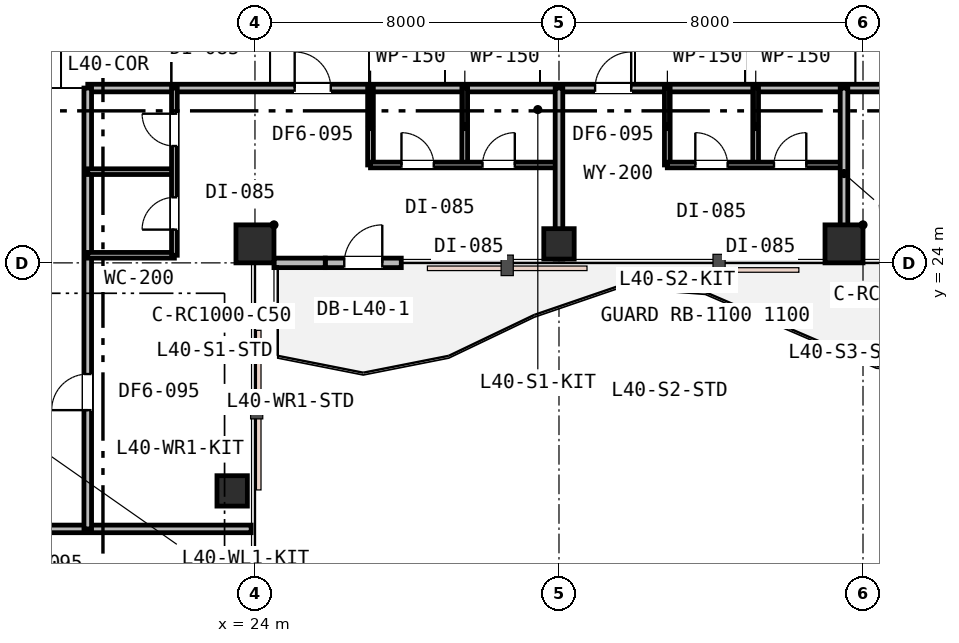
"""IFC4 building model, lengths in metres.
Left out: names, types, materials, properties, quantities, classifications, styles, units other than length and angle.
Written with IfcOpenShell. Run it as: python <this file> out.ifc"""

import sys

from ifc_helpers import new_model, si_unit, direction, frame, frame_2d, origin, origin_2d, place, context, subcontext, project, spatial, rectangle, extrude, element, fill, save


model = new_model("IFC4")
c1 = context("Model", 3, precision=1e-05, world=origin(), true_north=direction((0.0, 1.0)))
c2 = subcontext(c1, "Body", "Model", "MODEL_VIEW")
j1 = project(units=[si_unit("LENGTHUNIT", "METRE"), si_unit("PLANEANGLEUNIT", "RADIAN")], contexts=[c1])
p1 = place(None, origin())
s1 = spatial("IfcSite", under=j1, at=p1, CompositionType="ELEMENT")
p2 = place(p1, origin())
s2 = spatial("IfcBuilding", under=s1, at=p2, CompositionType="ELEMENT")
p3 = place(p2, frame((0.0, 0.0, 157.8)))
s3 = spatial("IfcBuildingStorey", under=s2, at=p3, CompositionType="ELEMENT", Elevation=157.8)
p4 = place(p3, frame((24.0, 24.5, 0.0), z_axis=(0.0, 0.0, 1.0), x_axis=(1.0, 0.0, 0.0)))
e1 = element("IfcColumn", 1, at=p4, inside=s3, PredefinedType="COLUMN", context=c2, shape_type="SweptSolid", body=[
    extrude(rectangle(XDim=1.0, YDim=1.0, at=origin_2d()), origin(), (0.0, 0.0, 1.0), 3.6),
])
p5 = place(p3, frame((32.0, 24.5, 0.0), z_axis=(0.0, 0.0, 1.0), x_axis=(1.0, 0.0, 0.0)))
e2 = element("IfcColumn", 2, at=p5, inside=s3, PredefinedType="COLUMN", context=c2, shape_type="SweptSolid", body=[
    extrude(rectangle(XDim=0.8, YDim=0.8, at=origin_2d()), origin(), (0.0, 0.0, 1.0), 3.6),
])
p6 = place(p3, frame((39.5, 24.5, 0.0), z_axis=(0.0, 0.0, 1.0), x_axis=(1.0, 0.0, 0.0)))
e3 = element("IfcColumn", 3, at=p6, inside=s3, PredefinedType="COLUMN", context=c2, shape_type="SweptSolid", body=[
    extrude(rectangle(XDim=1.0, YDim=1.0, at=origin_2d()), origin(), (0.0, 0.0, 1.0), 3.6),
])
p7 = place(p3, frame((23.4, 18.0, 0.0), z_axis=(0.0, 0.0, 1.0), x_axis=(1.0, 0.0, 0.0)))
e4 = element("IfcColumn", 4, at=p7, inside=s3, PredefinedType="COLUMN", context=c2, shape_type="SweptSolid", body=[
    extrude(rectangle(XDim=0.8, YDim=0.8, at=origin_2d()), origin(), (0.0, 0.0, 1.0), 3.6),
])
p8 = place(p3, frame((25.85, 24.0, 0.0), z_axis=(0.0, 0.0, 1.0), x_axis=(1.0, 0.0, 0.0)))
e5 = element("IfcWall", 5, at=p8, inside=s3, PredefinedType="STANDARD", context=c2, shape_type="SweptSolid", body=[
    extrude(rectangle(XDim=2.0, YDim=0.25, at=frame_2d((1.0, 0.0))), origin(), (0.0, 0.0, 1.0), 3.01),
])
p9 = place(p8, frame((0.5, 0.0, 0.0)))
e6 = element("IfcOpeningElement", 6, at=p9, cuts=e5, PredefinedType="OPENING", context=c2, shape_type="SweptSolid", body=[
    extrude(rectangle(XDim=1.0, YDim=2.15, at=frame_2d((0.5, 1.075))), frame((0.0, 0.135, 0.0), z_axis=(0.0, -1.0, 0.0), x_axis=(1.0, 0.0, 0.0)), (0.0, 0.0, 1.0), 0.27),
])
p10 = place(p3, frame((24.5, 24.0, 0.0), z_axis=(0.0, 0.0, 1.0), x_axis=(1.0, 0.0, 0.0)))
e7 = element("IfcWall", 7, at=p10, inside=s3, PredefinedType="STANDARD", context=c2, shape_type="SweptSolid", body=[
    extrude(rectangle(XDim=1.35, YDim=0.25, at=frame_2d((0.675, 0.0))), origin(), (0.0, 0.0, 1.0), 3.01),
])
p11 = place(p3, frame((19.6, 28.6, 0.0), z_axis=(0.0, 0.0, 1.0), x_axis=(1.0, 0.0, 0.0)))
e8 = element("IfcWall", 8, at=p11, inside=s3, PredefinedType="PARTITIONING", context=c2, shape_type="SweptSolid", body=[
    extrude(rectangle(XDim=31.3, YDim=0.2, at=frame_2d((15.65, 0.0))), origin(), (0.0, 0.0, 1.0), 2.93),
])
p12 = place(p11, frame((5.445, 0.0, 0.0)))
e9 = element("IfcOpeningElement", 9, at=p12, cuts=e8, PredefinedType="OPENING", context=c2, shape_type="SweptSolid", body=[
    extrude(rectangle(XDim=0.95, YDim=2.15, at=frame_2d((0.475, 1.075))), frame((0.0, 0.11, 0.0), z_axis=(0.0, -1.0, 0.0), x_axis=(1.0, 0.0, 0.0)), (0.0, 0.0, 1.0), 0.22),
])
p13 = place(p11, frame((13.35, 0.0, 0.0)))
e10 = element("IfcOpeningElement", 10, at=p13, cuts=e8, PredefinedType="OPENING", context=c2, shape_type="SweptSolid", body=[
    extrude(rectangle(XDim=0.95, YDim=2.15, at=frame_2d((0.475, 1.075))), frame((0.0, 0.11, 0.0), z_axis=(0.0, -1.0, 0.0), x_axis=(1.0, 0.0, 0.0)), (0.0, 0.0, 1.0), 0.22),
])
p14 = place(p11, frame((21.925, 0.0, 0.0)))
e11 = element("IfcOpeningElement", 11, at=p14, cuts=e8, PredefinedType="OPENING", context=c2, shape_type="SweptSolid", body=[
    extrude(rectangle(XDim=0.95, YDim=2.15, at=frame_2d((0.475, 1.075))), frame((0.0, 0.11, 0.0), z_axis=(0.0, -1.0, 0.0), x_axis=(1.0, 0.0, 0.0)), (0.0, 0.0, 1.0), 0.22),
])
for number, where, z_axis, x_axis in (
    (12, (27.04, 26.576, 0.0), (0.0, 0.0, 1.0), (0.0, 1.0, 0.0)),
    (13, (29.52, 26.576, 0.0), (0.0, 0.0, 1.0), (0.0, 1.0, 0.0)),
):
    element("IfcWall", number, at=place(p3, frame(where, z_axis=z_axis, x_axis=x_axis)), inside=s3, PredefinedType="PARTITIONING", context=c2, shape_type="SweptSolid", body=[
        extrude(rectangle(XDim=2.024, YDim=0.15, at=frame_2d((1.012, 0.0))), origin(), (0.0, 0.0, 1.0), 2.96),
    ])
p15 = place(p3, frame((27.04, 26.576, 0.0), z_axis=(0.0, 0.0, 1.0), x_axis=(1.0, 0.0, 0.0)))
e14 = element("IfcWall", 14, at=p15, inside=s3, PredefinedType="PARTITIONING", context=c2, shape_type="SweptSolid", body=[
    extrude(rectangle(XDim=4.96, YDim=0.15, at=frame_2d((2.48, 0.0))), origin(), (0.0, 0.0, 1.0), 2.93),
])
p16 = place(p15, frame((0.815, 0.0, 0.0)))
e15 = element("IfcOpeningElement", 15, at=p16, cuts=e14, PredefinedType="OPENING", context=c2, shape_type="SweptSolid", body=[
    extrude(rectangle(XDim=0.85, YDim=2.15, at=frame_2d((0.425, 1.075))), frame((0.0, 0.085, 0.0), z_axis=(0.0, -1.0, 0.0), x_axis=(1.0, 0.0, 0.0)), (0.0, 0.0, 1.0), 0.17),
])
p17 = place(p15, frame((2.947, 0.0, 0.0)))
e16 = element("IfcOpeningElement", 16, at=p17, cuts=e14, PredefinedType="OPENING", context=c2, shape_type="SweptSolid", body=[
    extrude(rectangle(XDim=0.85, YDim=2.15, at=frame_2d((0.425, 1.075))), frame((0.0, 0.085, 0.0), z_axis=(0.0, -1.0, 0.0), x_axis=(1.0, 0.0, 0.0)), (0.0, 0.0, 1.0), 0.17),
])
p18 = place(p3, frame((32.0, 24.1, 0.0), z_axis=(0.0, 0.0, 1.0), x_axis=(0.0, 1.0, 0.0)))
e17 = element("IfcWall", 17, at=p18, inside=s3, PredefinedType="PARTITIONING", context=c2, shape_type="SweptSolid", body=[
    extrude(rectangle(XDim=4.5, YDim=0.2, at=frame_2d((2.25, 0.0))), origin(), (0.0, 0.0, 1.0), 2.93),
])
for number, where, z_axis, x_axis in (
    (18, (34.85, 26.576, 0.0), (0.0, 0.0, 1.0), (0.0, 1.0, 0.0)),
    (19, (37.175, 26.576, 0.0), (0.0, 0.0, 1.0), (0.0, 1.0, 0.0)),
):
    element("IfcWall", number, at=place(p3, frame(where, z_axis=z_axis, x_axis=x_axis)), inside=s3, PredefinedType="PARTITIONING", context=c2, shape_type="SweptSolid", body=[
        extrude(rectangle(XDim=2.024, YDim=0.15, at=frame_2d((1.012, 0.0))), origin(), (0.0, 0.0, 1.0), 2.96),
    ])
p19 = place(p3, frame((34.85, 26.576, 0.0), z_axis=(0.0, 0.0, 1.0), x_axis=(1.0, 0.0, 0.0)))
e20 = element("IfcWall", 20, at=p19, inside=s3, PredefinedType="PARTITIONING", context=c2, shape_type="SweptSolid", body=[
    extrude(rectangle(XDim=4.65, YDim=0.15, at=frame_2d((2.325, 0.0))), origin(), (0.0, 0.0, 1.0), 2.93),
])
p20 = place(p19, frame((0.738, 0.0, 0.0)))
e21 = element("IfcOpeningElement", 21, at=p20, cuts=e20, PredefinedType="OPENING", context=c2, shape_type="SweptSolid", body=[
    extrude(rectangle(XDim=0.85, YDim=2.15, at=frame_2d((0.425, 1.075))), frame((0.0, 0.085, 0.0), z_axis=(0.0, -1.0, 0.0), x_axis=(1.0, 0.0, 0.0)), (0.0, 0.0, 1.0), 0.17),
])
p21 = place(p19, frame((2.808, 0.0, 0.0)))
e22 = element("IfcOpeningElement", 22, at=p21, cuts=e20, PredefinedType="OPENING", context=c2, shape_type="SweptSolid", body=[
    extrude(rectangle(XDim=0.85, YDim=2.15, at=frame_2d((0.425, 1.075))), frame((0.0, 0.085, 0.0), z_axis=(0.0, -1.0, 0.0), x_axis=(1.0, 0.0, 0.0)), (0.0, 0.0, 1.0), 0.17),
])
p22 = place(p3, frame((39.5, 24.1, 0.0), z_axis=(0.0, 0.0, 1.0), x_axis=(0.0, 1.0, 0.0)))
e23 = element("IfcWall", 23, at=p22, inside=s3, PredefinedType="PARTITIONING", context=c2, shape_type="SweptSolid", body=[
    extrude(rectangle(XDim=4.5, YDim=0.2, at=frame_2d((2.25, 0.0))), origin(), (0.0, 0.0, 1.0), 2.93),
])
p23 = place(p3, frame((5.1, 17.0, 0.0), z_axis=(0.0, 0.0, 1.0), x_axis=(1.0, 0.0, 0.0)))
e24 = element("IfcWall", 24, at=p23, inside=s3, PredefinedType="PARTITIONING", context=c2, shape_type="SweptSolid", body=[
    extrude(rectangle(XDim=18.8, YDim=0.2, at=frame_2d((9.4, 0.0))), origin(), (0.0, 0.0, 1.0), 2.93),
])
p24 = place(p23, frame((8.669, 0.0, 0.0)))
e25 = element("IfcOpeningElement", 25, at=p24, cuts=e24, PredefinedType="OPENING", context=c2, shape_type="SweptSolid", body=[
    extrude(rectangle(XDim=0.95, YDim=2.15, at=frame_2d((0.475, 1.075))), frame((0.0, 0.11, 0.0), z_axis=(0.0, -1.0, 0.0), x_axis=(1.0, 0.0, 0.0)), (0.0, 0.0, 1.0), 0.22),
])
p25 = place(p3, frame((19.6, 17.0, 0.0), z_axis=(0.0, 0.0, 1.0), x_axis=(0.0, 1.0, 0.0)))
e26 = element("IfcWall", 26, at=p25, inside=s3, PredefinedType="PARTITIONING", context=c2, shape_type="SweptSolid", body=[
    extrude(rectangle(XDim=11.6, YDim=0.2, at=frame_2d((5.8, 0.0))), origin(), (0.0, 0.0, 1.0), 2.93),
])
p26 = place(p25, frame((3.125, 0.0, 0.0)))
e27 = element("IfcOpeningElement", 27, at=p26, cuts=e26, PredefinedType="OPENING", context=c2, shape_type="SweptSolid", body=[
    extrude(rectangle(XDim=0.95, YDim=2.15, at=frame_2d((0.475, 1.075))), frame((0.0, 0.11, 0.0), z_axis=(0.0, -1.0, 0.0), x_axis=(1.0, 0.0, 0.0)), (0.0, 0.0, 1.0), 0.22),
])
p27 = place(p3, frame((19.6, 24.2, 0.0), z_axis=(0.0, 0.0, 1.0), x_axis=(1.0, 0.0, 0.0)))
e28 = element("IfcWall", 28, at=p27, inside=s3, PredefinedType="PARTITIONING", context=c2, shape_type="SweptSolid", body=[
    extrude(rectangle(XDim=2.28, YDim=0.15, at=frame_2d((1.14, 0.0))), origin(), (0.0, 0.0, 1.0), 2.93),
])
p28 = place(p3, frame((19.6, 26.4, 0.0), z_axis=(0.0, 0.0, 1.0), x_axis=(1.0, 0.0, 0.0)))
e29 = element("IfcWall", 29, at=p28, inside=s3, PredefinedType="PARTITIONING", context=c2, shape_type="SweptSolid", body=[
    extrude(rectangle(XDim=2.28, YDim=0.15, at=frame_2d((1.14, 0.0))), origin(), (0.0, 0.0, 1.0), 2.96),
])
p29 = place(p3, frame((21.88, 24.2, 0.0), z_axis=(0.0, 0.0, 1.0), x_axis=(0.0, 1.0, 0.0)))
e30 = element("IfcWall", 30, at=p29, inside=s3, PredefinedType="PARTITIONING", context=c2, shape_type="SweptSolid", body=[
    extrude(rectangle(XDim=4.4, YDim=0.15, at=frame_2d((2.2, 0.0))), origin(), (0.0, 0.0, 1.0), 2.93),
])
p30 = place(p29, frame((0.675, 0.0, 0.0)))
e31 = element("IfcOpeningElement", 31, at=p30, cuts=e30, PredefinedType="OPENING", context=c2, shape_type="SweptSolid", body=[
    extrude(rectangle(XDim=0.85, YDim=2.15, at=frame_2d((0.425, 1.075))), frame((0.0, 0.085, 0.0), z_axis=(0.0, -1.0, 0.0), x_axis=(1.0, 0.0, 0.0)), (0.0, 0.0, 1.0), 0.17),
])
p31 = place(p29, frame((2.875, 0.0, 0.0)))
e32 = element("IfcOpeningElement", 32, at=p31, cuts=e30, PredefinedType="OPENING", context=c2, shape_type="SweptSolid", body=[
    extrude(rectangle(XDim=0.85, YDim=2.15, at=frame_2d((0.425, 1.075))), frame((0.0, 0.085, 0.0), z_axis=(0.0, -1.0, 0.0), x_axis=(1.0, 0.0, 0.0)), (0.0, 0.0, 1.0), 0.17),
])
p32 = place(p9, origin())
e33 = element("IfcDoor", 33, at=p32, inside=s3, OperationType="SINGLE_SWING_RIGHT", PredefinedType="DOOR", context=c2, shape_type="SweptSolid", body=[
    extrude(rectangle(XDim=1.0, YDim=2.15, at=frame_2d((0.5, 1.075))), frame((0.0, 0.025, 0.0), z_axis=(0.0, -1.0, 0.0), x_axis=(1.0, 0.0, 0.0)), (0.0, 0.0, 1.0), 0.05),
])
fill(e6, e33)
p33 = place(p12, origin())
e34 = element("IfcDoor", 34, at=p33, inside=s3, OperationType="SINGLE_SWING_LEFT", PredefinedType="DOOR", context=c2, shape_type="SweptSolid", body=[
    extrude(rectangle(XDim=0.95, YDim=2.15, at=frame_2d((0.475, 1.075))), frame((0.0, 0.025, 0.0), z_axis=(0.0, -1.0, 0.0), x_axis=(1.0, 0.0, 0.0)), (0.0, 0.0, 1.0), 0.05),
])
fill(e9, e34)
p34 = place(p16, origin())
e35 = element("IfcDoor", 35, at=p34, inside=s3, OperationType="SINGLE_SWING_LEFT", PredefinedType="DOOR", context=c2, shape_type="SweptSolid", body=[
    extrude(rectangle(XDim=0.85, YDim=2.15, at=frame_2d((0.425, 1.075))), frame((0.0, 0.025, 0.0), z_axis=(0.0, -1.0, 0.0), x_axis=(1.0, 0.0, 0.0)), (0.0, 0.0, 1.0), 0.05),
])
fill(e15, e35)
p35 = place(p17, origin())
e36 = element("IfcDoor", 36, at=p35, inside=s3, OperationType="SINGLE_SWING_RIGHT", PredefinedType="DOOR", context=c2, shape_type="SweptSolid", body=[
    extrude(rectangle(XDim=0.85, YDim=2.15, at=frame_2d((0.425, 1.075))), frame((0.0, 0.025, 0.0), z_axis=(0.0, -1.0, 0.0), x_axis=(1.0, 0.0, 0.0)), (0.0, 0.0, 1.0), 0.05),
])
fill(e16, e36)
p36 = place(p13, origin())
e37 = element("IfcDoor", 37, at=p36, inside=s3, OperationType="SINGLE_SWING_RIGHT", PredefinedType="DOOR", context=c2, shape_type="SweptSolid", body=[
    extrude(rectangle(XDim=0.95, YDim=2.15, at=frame_2d((0.475, 1.075))), frame((0.0, 0.025, 0.0), z_axis=(0.0, -1.0, 0.0), x_axis=(1.0, 0.0, 0.0)), (0.0, 0.0, 1.0), 0.05),
])
fill(e10, e37)
p37 = place(p20, origin())
e38 = element("IfcDoor", 38, at=p37, inside=s3, OperationType="SINGLE_SWING_LEFT", PredefinedType="DOOR", context=c2, shape_type="SweptSolid", body=[
    extrude(rectangle(XDim=0.85, YDim=2.15, at=frame_2d((0.425, 1.075))), frame((0.0, 0.025, 0.0), z_axis=(0.0, -1.0, 0.0), x_axis=(1.0, 0.0, 0.0)), (0.0, 0.0, 1.0), 0.05),
])
fill(e21, e38)
p38 = place(p21, origin())
e39 = element("IfcDoor", 39, at=p38, inside=s3, OperationType="SINGLE_SWING_RIGHT", PredefinedType="DOOR", context=c2, shape_type="SweptSolid", body=[
    extrude(rectangle(XDim=0.85, YDim=2.15, at=frame_2d((0.425, 1.075))), frame((0.0, 0.025, 0.0), z_axis=(0.0, -1.0, 0.0), x_axis=(1.0, 0.0, 0.0)), (0.0, 0.0, 1.0), 0.05),
])
fill(e22, e39)
p39 = place(p26, origin())
e40 = element("IfcDoor", 40, at=p39, inside=s3, OperationType="SINGLE_SWING_LEFT", PredefinedType="DOOR", context=c2, shape_type="SweptSolid", body=[
    extrude(rectangle(XDim=0.95, YDim=2.15, at=frame_2d((0.475, 1.075))), frame((0.0, 0.025, 0.0), z_axis=(0.0, -1.0, 0.0), x_axis=(1.0, 0.0, 0.0)), (0.0, 0.0, 1.0), 0.05),
])
fill(e27, e40)
p40 = place(p30, origin())
e41 = element("IfcDoor", 41, at=p40, inside=s3, OperationType="SINGLE_SWING_LEFT", PredefinedType="DOOR", context=c2, shape_type="SweptSolid", body=[
    extrude(rectangle(XDim=0.85, YDim=2.15, at=frame_2d((0.425, 1.075))), frame((0.0, 0.025, 0.0), z_axis=(0.0, -1.0, 0.0), x_axis=(1.0, 0.0, 0.0)), (0.0, 0.0, 1.0), 0.05),
])
fill(e31, e41)
p41 = place(p31, origin())
e42 = element("IfcDoor", 42, at=p41, inside=s3, OperationType="SINGLE_SWING_RIGHT", PredefinedType="DOOR", context=c2, shape_type="SweptSolid", body=[
    extrude(rectangle(XDim=0.85, YDim=2.15, at=frame_2d((0.425, 1.075))), frame((0.0, 0.025, 0.0), z_axis=(0.0, -1.0, 0.0), x_axis=(1.0, 0.0, 0.0)), (0.0, 0.0, 1.0), 0.05),
])
fill(e32, e42)
save(model, sys.argv[1])
